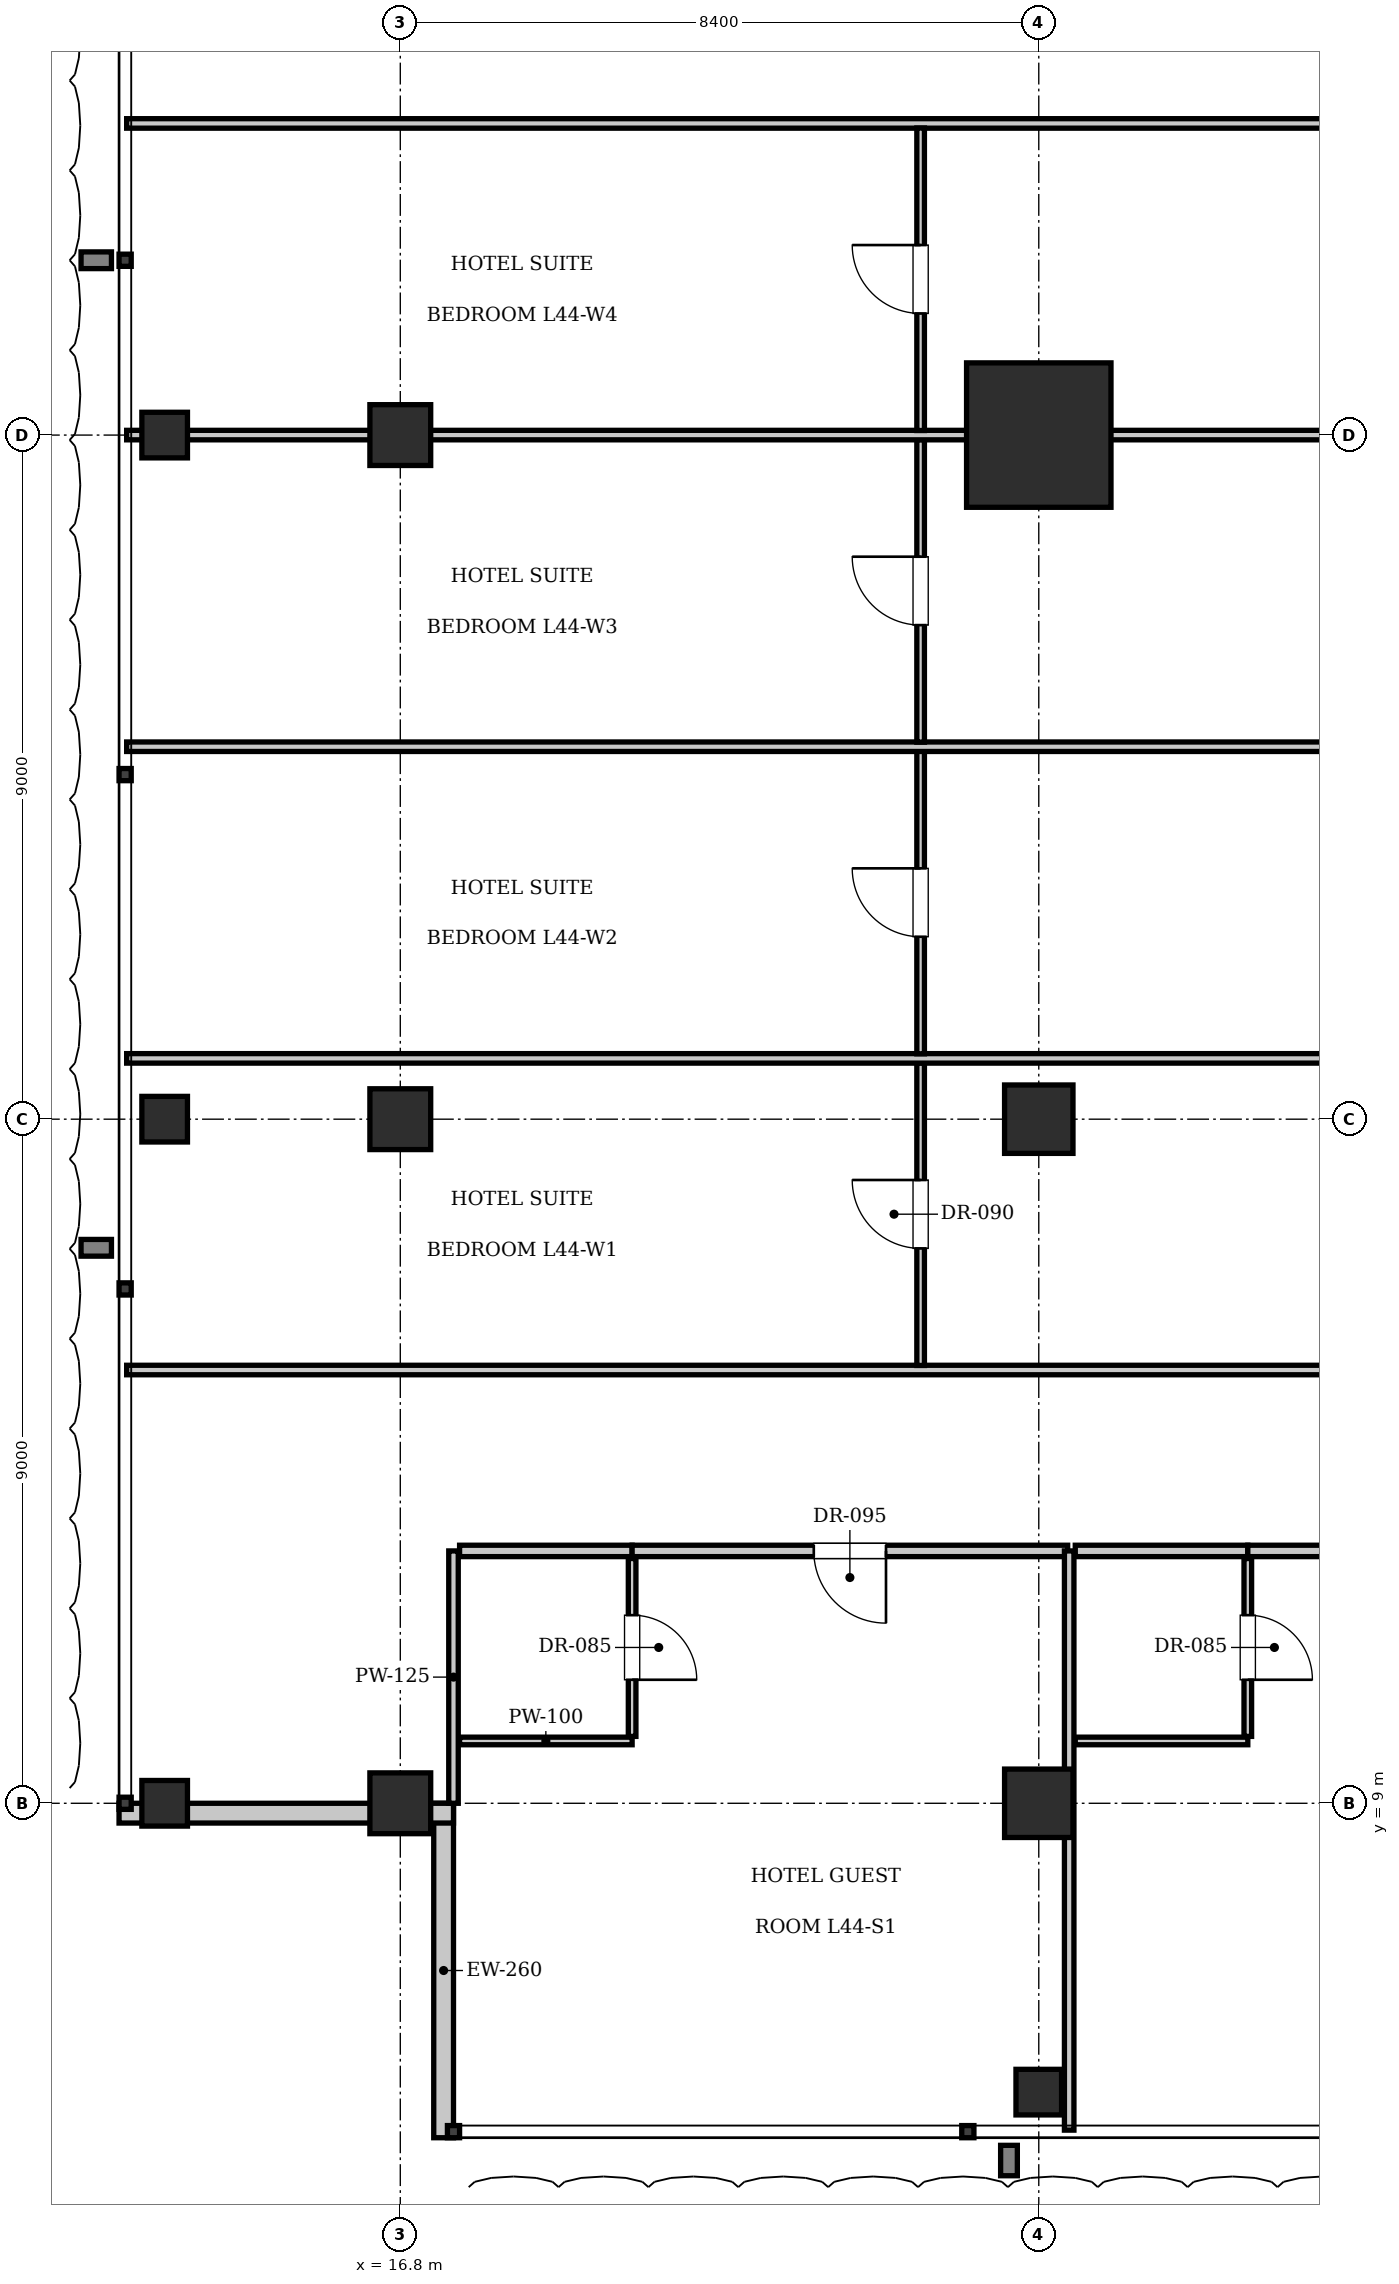
"""IFC4 building model, lengths in metres.
Left out: names, types, materials, properties, quantities, classifications, styles, units other than length and angle.
Written with IfcOpenShell. Run it as: python <this file> out.ifc"""

import sys

from ifc_helpers import new_model, si_unit, direction, frame, frame_2d, origin, origin_2d, place, context, subcontext, project, spatial, rectangle, i_section, extrude, element, fill, save


model = new_model("IFC4")
c1 = context("Model", 3, precision=1e-05, world=origin(), true_north=direction((0.0, 1.0)))
c2 = subcontext(c1, "Body", "Model", "MODEL_VIEW")
j1 = project(units=[si_unit("LENGTHUNIT", "METRE"), si_unit("PLANEANGLEUNIT", "RADIAN")], contexts=[c1])
p1 = place(None, origin())
s1 = spatial("IfcSite", under=j1, at=p1, CompositionType="ELEMENT")
p2 = place(p1, origin())
s2 = spatial("IfcBuilding", under=s1, at=p2, CompositionType="ELEMENT")
p3 = place(p2, frame((0.0, 0.0, 181.3)))
s3 = spatial("IfcBuildingStorey", under=s2, at=p3, CompositionType="ELEMENT", Elevation=181.3)
p4 = place(p3, frame((25.2, 27.0, 0.0), z_axis=(0.0, 0.0, 1.0), x_axis=(1.0, 0.0, 0.0)))
e1 = element("IfcColumn", 1, at=p4, inside=s3, PredefinedType="COLUMN", context=c2, shape_type="SweptSolid", body=[
    extrude(rectangle(XDim=1.9, YDim=1.9, at=origin_2d()), origin(), (0.0, 0.0, 1.0), 3.85),
])
for number, where, z_axis, x_axis in (
    (2, (25.2, 18.0, 0.0), (0.0, 0.0, 1.0), (1.0, 0.0, 0.0)),
    (3, (25.2, 9.0, 0.0), (0.0, 0.0, 1.0), (1.0, 0.0, 0.0)),
):
    element("IfcColumn", number, at=place(p3, frame(where, z_axis=z_axis, x_axis=x_axis)), inside=s3, PredefinedType="COLUMN", context=c2, shape_type="SweptSolid", body=[
        extrude(rectangle(XDim=0.9, YDim=0.9, at=origin_2d()), origin(), (0.0, 0.0, 1.0), 3.85),
    ])
for number, where, z_axis, x_axis in (
    (4, (16.8, 9.0, 0.0), (0.0, 0.0, 1.0), (1.0, 0.0, 0.0)),
    (5, (16.8, 18.0, 0.0), (0.0, 0.0, 1.0), (1.0, 0.0, 0.0)),
    (6, (16.8, 27.0, 0.0), (0.0, 0.0, 1.0), (1.0, 0.0, 0.0)),
):
    element("IfcColumn", number, at=place(p3, frame(where, z_axis=z_axis, x_axis=x_axis)), inside=s3, PredefinedType="COLUMN", context=c2, shape_type="SweptSolid", body=[
        extrude(rectangle(XDim=0.8, YDim=0.8, at=origin_2d()), origin(), (0.0, 0.0, 1.0), 3.85),
    ])
for number, where, z_axis, x_axis in (
    (7, (13.7, 9.0, 0.0), (0.0, 0.0, 1.0), (1.0, 0.0, 0.0)),
    (8, (13.7, 18.0, 0.0), (0.0, 0.0, 1.0), (1.0, 0.0, 0.0)),
    (9, (13.7, 27.0, 0.0), (0.0, 0.0, 1.0), (1.0, 0.0, 0.0)),
    (10, (25.2, 5.2, 0.0), (0.0, 0.0, 1.0), (1.0, 0.0, 0.0)),
):
    element("IfcColumn", number, at=place(p3, frame(where, z_axis=z_axis, x_axis=x_axis)), inside=s3, PredefinedType="COLUMN", context=c2, shape_type="SweptSolid", body=[
        extrude(i_section(OverallWidth=0.6, OverallDepth=0.6, WebThickness=0.025, FlangeThickness=0.038, at=origin_2d()), origin(), (0.0, 0.0, 1.0), 3.85),
    ])
p5 = place(p3, frame((17.37, 4.6, 0.0), z_axis=(0.0, 0.0, 1.0), x_axis=(0.0, 1.0, 0.0)))
e11 = element("IfcWall", 11, at=p5, inside=s3, PredefinedType="SOLIDWALL", context=c2, shape_type="SweptSolid", body=[
    extrude(rectangle(XDim=4.4, YDim=0.26, at=frame_2d((2.2, 0.0))), origin(), (0.0, 0.0, 1.0), 3.61),
])
p6 = place(p3, frame((17.5, 8.87, 0.0), z_axis=(0.0, 0.0, 1.0), x_axis=(-1.0, 0.0, 0.0)))
e12 = element("IfcWall", 12, at=p6, inside=s3, PredefinedType="SOLIDWALL", context=c2, shape_type="SweptSolid", body=[
    extrude(rectangle(XDim=4.4, YDim=0.26, at=frame_2d((2.2, 0.0))), origin(), (0.0, 0.0, 1.0), 3.007),
])
p7 = place(p3, frame((17.5, 9.0, 0.0), z_axis=(0.0, 0.0, 1.0), x_axis=(0.0, 1.0, 0.0)))
e13 = element("IfcWall", 13, at=p7, inside=s3, PredefinedType="PARTITIONING", context=c2, shape_type="SweptSolid", body=[
    extrude(rectangle(XDim=3.32, YDim=0.125, at=frame_2d((1.66, 0.0))), origin(), (0.0, 0.0, 1.0), 3.61),
])
p8 = place(p3, frame((17.58, 12.32, 0.0), z_axis=(0.0, 0.0, 1.0), x_axis=(1.0, 0.0, 0.0)))
e14 = element("IfcWall", 14, at=p8, inside=s3, PredefinedType="PARTITIONING", context=c2, shape_type="SweptSolid", body=[
    extrude(rectangle(XDim=2.27, YDim=0.15, at=frame_2d((1.135, 0.0))), origin(), (0.0, 0.0, 1.0), 3.61),
])
p9 = place(p3, frame((17.58, 9.82, 0.0), z_axis=(0.0, 0.0, 1.0), x_axis=(1.0, 0.0, 0.0)))
e15 = element("IfcWall", 15, at=p9, inside=s3, PredefinedType="PARTITIONING", context=c2, shape_type="SweptSolid", body=[
    extrude(rectangle(XDim=2.27, YDim=0.1, at=frame_2d((1.135, 0.0))), origin(), (0.0, 0.0, 1.0), 3.61),
])
p10 = place(p3, frame((19.85, 9.88, 0.0), z_axis=(0.0, 0.0, 1.0), x_axis=(0.0, 1.0, 0.0)))
e16 = element("IfcWall", 16, at=p10, inside=s3, PredefinedType="PARTITIONING", context=c2, shape_type="SweptSolid", body=[
    extrude(rectangle(XDim=2.34, YDim=0.1, at=frame_2d((1.17, 0.0))), origin(), (0.0, 0.0, 1.0), 3.61),
])
p11 = place(p10, frame((0.745, 0.0, 0.0)))
e17 = element("IfcOpeningElement", 17, at=p11, cuts=e16, PredefinedType="OPENING", context=c2, shape_type="SweptSolid", body=[
    extrude(rectangle(XDim=0.85, YDim=2.1, at=frame_2d((0.425, 1.05))), frame((0.0, 0.06, 0.0), z_axis=(0.0, -1.0, 0.0), x_axis=(1.0, 0.0, 0.0)), (0.0, 0.0, 1.0), 0.12),
])
p12 = place(p3, frame((19.85, 12.32, 0.0), z_axis=(0.0, 0.0, 1.0), x_axis=(1.0, 0.0, 0.0)))
e18 = element("IfcWall", 18, at=p12, inside=s3, PredefinedType="PARTITIONING", context=c2, shape_type="SweptSolid", body=[
    extrude(rectangle(XDim=5.73, YDim=0.15, at=frame_2d((2.865, 0.0))), origin(), (0.0, 0.0, 1.0), 3.61),
])
p13 = place(p12, frame((2.39, 0.0, 0.0)))
e19 = element("IfcOpeningElement", 19, at=p13, cuts=e18, PredefinedType="OPENING", context=c2, shape_type="SweptSolid", body=[
    extrude(rectangle(XDim=0.95, YDim=2.15, at=frame_2d((0.475, 1.075))), frame((0.0, 0.085, 0.0), z_axis=(0.0, -1.0, 0.0), x_axis=(1.0, 0.0, 0.0)), (0.0, 0.0, 1.0), 0.17),
])
p14 = place(p3, frame((25.6, 4.7, 0.0), z_axis=(0.0, 0.0, 1.0), x_axis=(0.0, 1.0, 0.0)))
e20 = element("IfcWall", 20, at=p14, inside=s3, PredefinedType="PARTITIONING", context=c2, shape_type="SweptSolid", body=[
    extrude(rectangle(XDim=7.62, YDim=0.125, at=frame_2d((3.81, 0.0))), origin(), (0.0, 0.0, 1.0), 3.61),
])
p15 = place(p3, frame((25.68, 12.32, 0.0), z_axis=(0.0, 0.0, 1.0), x_axis=(1.0, 0.0, 0.0)))
e21 = element("IfcWall", 21, at=p15, inside=s3, PredefinedType="PARTITIONING", context=c2, shape_type="SweptSolid", body=[
    extrude(rectangle(XDim=2.27, YDim=0.15, at=frame_2d((1.135, 0.0))), origin(), (0.0, 0.0, 1.0), 3.61),
])
p16 = place(p3, frame((25.68, 9.82, 0.0), z_axis=(0.0, 0.0, 1.0), x_axis=(1.0, 0.0, 0.0)))
e22 = element("IfcWall", 22, at=p16, inside=s3, PredefinedType="PARTITIONING", context=c2, shape_type="SweptSolid", body=[
    extrude(rectangle(XDim=2.27, YDim=0.1, at=frame_2d((1.135, 0.0))), origin(), (0.0, 0.0, 1.0), 3.61),
])
p17 = place(p3, frame((27.95, 9.88, 0.0), z_axis=(0.0, 0.0, 1.0), x_axis=(0.0, 1.0, 0.0)))
e23 = element("IfcWall", 23, at=p17, inside=s3, PredefinedType="PARTITIONING", context=c2, shape_type="SweptSolid", body=[
    extrude(rectangle(XDim=2.34, YDim=0.1, at=frame_2d((1.17, 0.0))), origin(), (0.0, 0.0, 1.0), 3.61),
])
p18 = place(p17, frame((0.745, 0.0, 0.0)))
e24 = element("IfcOpeningElement", 24, at=p18, cuts=e23, PredefinedType="OPENING", context=c2, shape_type="SweptSolid", body=[
    extrude(rectangle(XDim=0.85, YDim=2.1, at=frame_2d((0.425, 1.05))), frame((0.0, 0.06, 0.0), z_axis=(0.0, -1.0, 0.0), x_axis=(1.0, 0.0, 0.0)), (0.0, 0.0, 1.0), 0.12),
])
p19 = place(p3, frame((27.95, 12.32, 0.0), z_axis=(0.0, 0.0, 1.0), x_axis=(1.0, 0.0, 0.0)))
e25 = element("IfcWall", 25, at=p19, inside=s3, PredefinedType="PARTITIONING", context=c2, shape_type="SweptSolid", body=[
    extrude(rectangle(XDim=5.73, YDim=0.15, at=frame_2d((2.865, 0.0))), origin(), (0.0, 0.0, 1.0), 3.61),
])
p20 = place(p19, frame((2.39, 0.0, 0.0)))
e26 = element("IfcOpeningElement", 26, at=p20, cuts=e25, PredefinedType="OPENING", context=c2, shape_type="SweptSolid", body=[
    extrude(rectangle(XDim=0.95, YDim=2.15, at=frame_2d((0.475, 1.075))), frame((0.0, 0.085, 0.0), z_axis=(0.0, -1.0, 0.0), x_axis=(1.0, 0.0, 0.0)), (0.0, 0.0, 1.0), 0.17),
])
for number, where, z_axis, x_axis in (
    (27, (13.2, 14.7, 0.0), (0.0, 0.0, 1.0), (1.0, 0.0, 0.0)),
    (28, (13.2, 31.1, 0.0), (0.0, 0.0, 1.0), (1.0, 0.0, 0.0)),
):
    element("IfcWall", number, at=place(p3, frame(where, z_axis=z_axis, x_axis=x_axis)), inside=s3, PredefinedType="PARTITIONING", context=c2, shape_type="SweptSolid", body=[
        extrude(rectangle(XDim=24.32, YDim=0.125, at=frame_2d((12.16, 0.0))), origin(), (0.0, 0.0, 1.0), 3.61),
    ])
p21 = place(p3, frame((23.646, 14.76, 0.0), z_axis=(0.0, 0.0, 1.0), x_axis=(0.0, 1.0, 0.0)))
e29 = element("IfcWall", 29, at=p21, inside=s3, PredefinedType="PARTITIONING", context=c2, shape_type="SweptSolid", body=[
    extrude(rectangle(XDim=3.98, YDim=0.1, at=frame_2d((1.99, 0.0))), origin(), (0.0, 0.0, 1.0), 3.61),
])
p22 = place(p21, frame((1.54, 0.0, 0.0)))
e30 = element("IfcOpeningElement", 30, at=p22, cuts=e29, PredefinedType="OPENING", context=c2, shape_type="SweptSolid", body=[
    extrude(rectangle(XDim=0.9, YDim=2.1, at=frame_2d((0.45, 1.05))), frame((0.0, 0.06, 0.0), z_axis=(0.0, -1.0, 0.0), x_axis=(1.0, 0.0, 0.0)), (0.0, 0.0, 1.0), 0.12),
])
p23 = place(p3, frame((13.2, 18.8, 0.0), z_axis=(0.0, 0.0, 1.0), x_axis=(1.0, 0.0, 0.0)))
e31 = element("IfcWall", 31, at=p23, inside=s3, PredefinedType="PARTITIONING", context=c2, shape_type="SweptSolid", body=[
    extrude(rectangle(XDim=24.32, YDim=0.125, at=frame_2d((12.16, 0.0))), origin(), (0.0, 0.0, 1.0), 3.61),
])
p24 = place(p3, frame((23.646, 18.86, 0.0), z_axis=(0.0, 0.0, 1.0), x_axis=(0.0, 1.0, 0.0)))
e32 = element("IfcWall", 32, at=p24, inside=s3, PredefinedType="PARTITIONING", context=c2, shape_type="SweptSolid", body=[
    extrude(rectangle(XDim=3.98, YDim=0.1, at=frame_2d((1.99, 0.0))), origin(), (0.0, 0.0, 1.0), 3.61),
])
p25 = place(p24, frame((1.54, 0.0, 0.0)))
e33 = element("IfcOpeningElement", 33, at=p25, cuts=e32, PredefinedType="OPENING", context=c2, shape_type="SweptSolid", body=[
    extrude(rectangle(XDim=0.9, YDim=2.1, at=frame_2d((0.45, 1.05))), frame((0.0, 0.06, 0.0), z_axis=(0.0, -1.0, 0.0), x_axis=(1.0, 0.0, 0.0)), (0.0, 0.0, 1.0), 0.12),
])
p26 = place(p3, frame((13.2, 22.9, 0.0), z_axis=(0.0, 0.0, 1.0), x_axis=(1.0, 0.0, 0.0)))
e34 = element("IfcWall", 34, at=p26, inside=s3, PredefinedType="PARTITIONING", context=c2, shape_type="SweptSolid", body=[
    extrude(rectangle(XDim=24.32, YDim=0.125, at=frame_2d((12.16, 0.0))), origin(), (0.0, 0.0, 1.0), 3.61),
])
p27 = place(p3, frame((23.646, 22.96, 0.0), z_axis=(0.0, 0.0, 1.0), x_axis=(0.0, 1.0, 0.0)))
e35 = element("IfcWall", 35, at=p27, inside=s3, PredefinedType="PARTITIONING", context=c2, shape_type="SweptSolid", body=[
    extrude(rectangle(XDim=3.98, YDim=0.1, at=frame_2d((1.99, 0.0))), origin(), (0.0, 0.0, 1.0), 3.61),
])
p28 = place(p27, frame((1.54, 0.0, 0.0)))
e36 = element("IfcOpeningElement", 36, at=p28, cuts=e35, PredefinedType="OPENING", context=c2, shape_type="SweptSolid", body=[
    extrude(rectangle(XDim=0.9, YDim=2.1, at=frame_2d((0.45, 1.05))), frame((0.0, 0.06, 0.0), z_axis=(0.0, -1.0, 0.0), x_axis=(1.0, 0.0, 0.0)), (0.0, 0.0, 1.0), 0.12),
])
p29 = place(p3, frame((13.2, 27.0, 0.0), z_axis=(0.0, 0.0, 1.0), x_axis=(1.0, 0.0, 0.0)))
e37 = element("IfcWall", 37, at=p29, inside=s3, PredefinedType="PARTITIONING", context=c2, shape_type="SweptSolid", body=[
    extrude(rectangle(XDim=24.32, YDim=0.125, at=frame_2d((12.16, 0.0))), origin(), (0.0, 0.0, 1.0), 2.41),
])
p30 = place(p3, frame((23.646, 27.06, 0.0), z_axis=(0.0, 0.0, 1.0), x_axis=(0.0, 1.0, 0.0)))
e38 = element("IfcWall", 38, at=p30, inside=s3, PredefinedType="PARTITIONING", context=c2, shape_type="SweptSolid", body=[
    extrude(rectangle(XDim=3.98, YDim=0.1, at=frame_2d((1.99, 0.0))), origin(), (0.0, 0.0, 1.0), 3.61),
])
p31 = place(p30, frame((1.54, 0.0, 0.0)))
e39 = element("IfcOpeningElement", 39, at=p31, cuts=e38, PredefinedType="OPENING", context=c2, shape_type="SweptSolid", body=[
    extrude(rectangle(XDim=0.9, YDim=2.1, at=frame_2d((0.45, 1.05))), frame((0.0, 0.06, 0.0), z_axis=(0.0, -1.0, 0.0), x_axis=(1.0, 0.0, 0.0)), (0.0, 0.0, 1.0), 0.12),
])
p32 = place(p11, frame((0.85, 0.0, 0.0), z_axis=(0.0, 0.0, 1.0), x_axis=(-1.0, 0.0, 0.0)))
e40 = element("IfcDoor", 40, at=p32, inside=s3, OperationType="SINGLE_SWING_RIGHT", PredefinedType="DOOR", context=c2, shape_type="SweptSolid", body=[
    extrude(rectangle(XDim=0.85, YDim=2.1, at=frame_2d((0.425, 1.05))), frame((0.0, 0.025, 0.0), z_axis=(0.0, -1.0, 0.0), x_axis=(1.0, 0.0, 0.0)), (0.0, 0.0, 1.0), 0.05),
])
fill(e17, e40)
p33 = place(p13, frame((0.95, 0.0, 0.0), z_axis=(0.0, 0.0, 1.0), x_axis=(-1.0, 0.0, 0.0)))
e41 = element("IfcDoor", 41, at=p33, inside=s3, OperationType="SINGLE_SWING_LEFT", PredefinedType="DOOR", context=c2, shape_type="SweptSolid", body=[
    extrude(rectangle(XDim=0.95, YDim=2.15, at=frame_2d((0.475, 1.075))), frame((0.0, 0.025, 0.0), z_axis=(0.0, -1.0, 0.0), x_axis=(1.0, 0.0, 0.0)), (0.0, 0.0, 1.0), 0.05),
])
fill(e19, e41)
p34 = place(p18, frame((0.85, 0.0, 0.0), z_axis=(0.0, 0.0, 1.0), x_axis=(-1.0, 0.0, 0.0)))
e42 = element("IfcDoor", 42, at=p34, inside=s3, OperationType="SINGLE_SWING_RIGHT", PredefinedType="DOOR", context=c2, shape_type="SweptSolid", body=[
    extrude(rectangle(XDim=0.85, YDim=2.1, at=frame_2d((0.425, 1.05))), frame((0.0, 0.025, 0.0), z_axis=(0.0, -1.0, 0.0), x_axis=(1.0, 0.0, 0.0)), (0.0, 0.0, 1.0), 0.05),
])
fill(e24, e42)
p35 = place(p22, origin())
e43 = element("IfcDoor", 43, at=p35, inside=s3, OperationType="SINGLE_SWING_RIGHT", PredefinedType="DOOR", context=c2, shape_type="SweptSolid", body=[
    extrude(rectangle(XDim=0.9, YDim=2.1, at=frame_2d((0.45, 1.05))), frame((0.0, 0.025, 0.0), z_axis=(0.0, -1.0, 0.0), x_axis=(1.0, 0.0, 0.0)), (0.0, 0.0, 1.0), 0.05),
])
fill(e30, e43)
p36 = place(p25, origin())
e44 = element("IfcDoor", 44, at=p36, inside=s3, OperationType="SINGLE_SWING_RIGHT", PredefinedType="DOOR", context=c2, shape_type="SweptSolid", body=[
    extrude(rectangle(XDim=0.9, YDim=2.1, at=frame_2d((0.45, 1.05))), frame((0.0, 0.025, 0.0), z_axis=(0.0, -1.0, 0.0), x_axis=(1.0, 0.0, 0.0)), (0.0, 0.0, 1.0), 0.05),
])
fill(e33, e44)
p37 = place(p28, origin())
e45 = element("IfcDoor", 45, at=p37, inside=s3, OperationType="SINGLE_SWING_RIGHT", PredefinedType="DOOR", context=c2, shape_type="SweptSolid", body=[
    extrude(rectangle(XDim=0.9, YDim=2.1, at=frame_2d((0.45, 1.05))), frame((0.0, 0.025, 0.0), z_axis=(0.0, -1.0, 0.0), x_axis=(1.0, 0.0, 0.0)), (0.0, 0.0, 1.0), 0.05),
])
fill(e36, e45)
p38 = place(p31, origin())
e46 = element("IfcDoor", 46, at=p38, inside=s3, OperationType="SINGLE_SWING_RIGHT", PredefinedType="DOOR", context=c2, shape_type="SweptSolid", body=[
    extrude(rectangle(XDim=0.9, YDim=2.1, at=frame_2d((0.45, 1.05))), frame((0.0, 0.025, 0.0), z_axis=(0.0, -1.0, 0.0), x_axis=(1.0, 0.0, 0.0)), (0.0, 0.0, 1.0), 0.05),
])
fill(e39, e46)
save(model, sys.argv[1])
